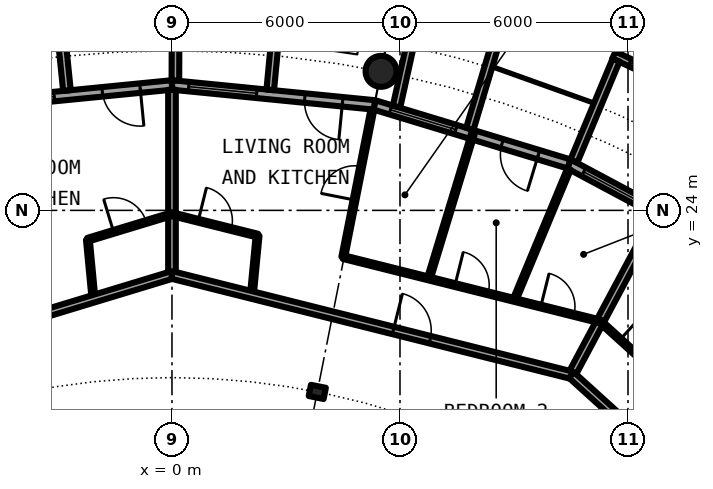
"""IFC4 building model, lengths in metres.
Left out: names, types, materials, properties, quantities, classifications, styles, units other than length and angle.
Written with IfcOpenShell. Run it as: python <this file> out.ifc"""

import sys

from ifc_helpers import new_model, si_unit, direction, frame, frame_2d, origin, origin_2d, place, context, subcontext, project, spatial, rectangle, circle, hollow_circle, i_section, extrude, element, fill, save


model = new_model("IFC4")
c1 = context("Model", 3, precision=1e-05, world=origin(), true_north=direction((0.0, 1.0)))
c2 = subcontext(c1, "Body", "Model", "MODEL_VIEW")
j1 = project(units=[si_unit("LENGTHUNIT", "METRE"), si_unit("PLANEANGLEUNIT", "RADIAN")], contexts=[c1])
p1 = place(None, origin())
s1 = spatial("IfcSite", under=j1, at=p1, CompositionType="ELEMENT")
p2 = place(p1, origin())
s2 = spatial("IfcBuilding", under=s1, at=p2, CompositionType="ELEMENT")
p3 = place(p2, frame((0.0, 0.0, 196.3)))
s3 = spatial("IfcBuildingStorey", under=s2, at=p3, CompositionType="ELEMENT", Elevation=196.3)
p4 = place(p3, frame((5.501, 27.658, 0.0), z_axis=(0.0, 0.0, 1.0), x_axis=(1.0, 0.0, 0.0)))
e1 = element("IfcColumn", 1, at=p4, inside=s3, PredefinedType="COLUMN", context=c2, shape_type="SweptSolid", body=[
    extrude(hollow_circle(Radius=0.406, WallThickness=0.03, at=origin_2d()), origin(), (0.0, 0.0, 1.0), 3.05),
])
p5 = place(p3, frame((3.824, 19.223, 0.0), z_axis=(0.0, 0.0, 1.0), x_axis=(0.195090322016, 0.980785280403, 0.0)))
e2 = element("IfcColumn", 2, at=p5, inside=s3, PredefinedType="COLUMN", context=c2, shape_type="SweptSolid", body=[
    extrude(i_section(OverallWidth=0.3, OverallDepth=0.4, WebThickness=0.013, FlangeThickness=0.024, FilletRadius=0.027, at=origin_2d()), origin(), (0.0, 0.0, 1.0), 3.05),
])
p6 = place(p3, frame((15.167, 22.699, 0.0), z_axis=(0.0, 0.0, 1.0), x_axis=(-0.881915646801, 0.471407246368, 0.0)))
e3 = element("IfcWall", 3, at=p6, inside=s3, PredefinedType="SOLIDWALL", context=c2, shape_type="SweptSolid", body=[
    extrude(rectangle(XDim=5.352, YDim=0.25, at=frame_2d((2.676, 0.0))), origin(), (0.0, 0.0, 1.0), 2.7),
])
p7 = place(p6, frame((0.841, 0.0, 0.0)))
e4 = element("IfcOpeningElement", 4, at=p7, cuts=e3, PredefinedType="OPENING", context=c2, shape_type="SweptSolid", body=[
    extrude(rectangle(XDim=1.0, YDim=2.2, at=frame_2d((0.5, 1.1))), frame((0.0, 0.135, 0.0), z_axis=(0.0, -1.0, 0.0), x_axis=(1.0, 0.0, 0.0)), (0.0, 0.0, 1.0), 0.27),
])
p8 = place(p6, frame((3.111, 0.0, 0.3)))
e5 = element("IfcOpeningElement", 5, at=p8, cuts=e3, PredefinedType="OPENING", context=c2, shape_type="SweptSolid", body=[
    extrude(rectangle(XDim=1.8, YDim=2.1, at=frame_2d((0.9, 1.05))), frame((0.0, 0.135, 0.0), z_axis=(0.0, -1.0, 0.0), x_axis=(1.0, 0.0, 0.0)), (0.0, 0.0, 1.0), 0.27),
])
p9 = place(p3, frame((14.335, 26.808, -0.03), z_axis=(0.0, 0.0, 1.0), x_axis=(-0.904000060331, 0.427532327342, 0.0)))
e6 = element("IfcWall", 6, at=p9, inside=s3, PredefinedType="SOLIDWALL", context=c2, shape_type="SweptSolid", body=[
    extrude(rectangle(XDim=2.993, YDim=0.2, at=frame_2d((1.497, 0.0))), origin(), (0.0, 0.0, 1.0), 2.73),
])
p10 = place(p9, frame((0.457, 0.0, 0.33)))
e7 = element("IfcOpeningElement", 7, at=p10, cuts=e6, PredefinedType="OPENING", context=c2, shape_type="SweptSolid", body=[
    extrude(circle(Radius=1.04, at=frame_2d((1.04, 1.04))), frame((0.0, 0.11, 0.0), z_axis=(0.0, -1.0, 0.0), x_axis=(1.0, 0.0, 0.0)), (0.0, 0.0, 1.0), 0.22),
])
p11 = place(p3, frame((10.575, 25.295, -0.03), z_axis=(0.0, 0.0, 1.0), x_axis=(0.385697364644, 0.922625353492, 0.0)))
e8 = element("IfcWall", 8, at=p11, inside=s3, PredefinedType="SOLIDWALL", context=c2, shape_type="SweptSolid", body=[
    extrude(rectangle(XDim=2.883, YDim=0.2, at=frame_2d((1.442, 0.0))), origin(), (0.0, 0.0, 1.0), 2.73),
])
p12 = place(p3, frame((10.447, 25.222, 0.0), z_axis=(0.0, 0.0, 1.0), x_axis=(-0.956965678721, 0.290201119486, 0.0)))
e9 = element("IfcWall", 9, at=p12, inside=s3, PredefinedType="SOLIDWALL", context=c2, shape_type="SweptSolid", body=[
    extrude(rectangle(XDim=5.351, YDim=0.25, at=frame_2d((2.676, 0.0))), origin(), (0.0, 0.0, 1.0), 2.7),
])
p13 = place(p12, frame((0.841, 0.0, 0.0)))
e10 = element("IfcOpeningElement", 10, at=p13, cuts=e9, PredefinedType="OPENING", context=c2, shape_type="SweptSolid", body=[
    extrude(rectangle(XDim=1.0, YDim=2.2, at=frame_2d((0.5, 1.1))), frame((0.0, 0.135, 0.0), z_axis=(0.0, -1.0, 0.0), x_axis=(1.0, 0.0, 0.0)), (0.0, 0.0, 1.0), 0.27),
])
p14 = place(p12, frame((3.111, 0.0, 0.3)))
e11 = element("IfcOpeningElement", 11, at=p14, cuts=e9, PredefinedType="OPENING", context=c2, shape_type="SweptSolid", body=[
    extrude(rectangle(XDim=1.8, YDim=2.1, at=frame_2d((0.9, 1.05))), frame((0.0, 0.135, 0.0), z_axis=(0.0, -1.0, 0.0), x_axis=(1.0, 0.0, 0.0)), (0.0, 0.0, 1.0), 0.27),
])
p15 = place(p3, frame((7.837, 26.144, -0.03), z_axis=(0.0, 0.0, 1.0), x_axis=(0.287064767992, 0.957911174889, 0.0)))
e12 = element("IfcWall", 12, at=p15, inside=s3, PredefinedType="SOLIDWALL", context=c2, shape_type="SweptSolid", body=[
    extrude(rectangle(XDim=3.006, YDim=0.2, at=frame_2d((1.503, 0.0))), origin(), (0.0, 0.0, 1.0), 2.73),
])
p16 = place(p3, frame((5.909, 26.729, -0.03), z_axis=(0.0, 0.0, 1.0), x_axis=(0.216409053917, 0.976302781612, 0.0)))
e13 = element("IfcWall", 13, at=p16, inside=s3, PredefinedType="SOLIDWALL", context=c2, shape_type="SweptSolid", body=[
    extrude(rectangle(XDim=2.925, YDim=0.2, at=frame_2d((1.463, 0.0))), origin(), (0.0, 0.0, 1.0), 2.73),
])
p17 = place(p3, frame((5.326, 26.775, 0.0), z_axis=(0.0, 0.0, 1.0), x_axis=(-0.995173996315, 0.098126026407, 0.0)))
e14 = element("IfcWall", 14, at=p17, inside=s3, PredefinedType="SOLIDWALL", context=c2, shape_type="SweptSolid", body=[
    extrude(rectangle(XDim=5.352, YDim=0.25, at=frame_2d((2.676, 0.0))), origin(), (0.0, 0.0, 1.0), 2.7),
])
p18 = place(p17, frame((0.841, 0.0, 0.0)))
e15 = element("IfcOpeningElement", 15, at=p18, cuts=e14, PredefinedType="OPENING", context=c2, shape_type="SweptSolid", body=[
    extrude(rectangle(XDim=1.0, YDim=2.2, at=frame_2d((0.5, 1.1))), frame((0.0, 0.135, 0.0), z_axis=(0.0, -1.0, 0.0), x_axis=(1.0, 0.0, 0.0)), (0.0, 0.0, 1.0), 0.27),
])
p19 = place(p17, frame((3.111, 0.0, 0.3)))
e16 = element("IfcOpeningElement", 16, at=p19, cuts=e14, PredefinedType="OPENING", context=c2, shape_type="SweptSolid", body=[
    extrude(rectangle(XDim=1.8, YDim=2.1, at=frame_2d((0.9, 1.05))), frame((0.0, 0.135, 0.0), z_axis=(0.0, -1.0, 0.0), x_axis=(1.0, 0.0, 0.0)), (0.0, 0.0, 1.0), 0.27),
])
p20 = place(p3, frame((2.586, 27.171, -0.03), z_axis=(0.0, 0.0, 1.0), x_axis=(0.094548432284, 0.995520262954, 0.0)))
e17 = element("IfcWall", 17, at=p20, inside=s3, PredefinedType="SOLIDWALL", context=c2, shape_type="SweptSolid", body=[
    extrude(rectangle(XDim=3.006, YDim=0.2, at=frame_2d((1.503, 0.0))), origin(), (0.0, 0.0, 1.0), 2.73),
])
p21 = place(p3, frame((0.09, 27.417, -0.03), z_axis=(0.0, 0.0, 1.0), x_axis=(0.00347308367, 0.999993968827, 0.0)))
e18 = element("IfcWall", 18, at=p21, inside=s3, PredefinedType="SOLIDWALL", context=c2, shape_type="SweptSolid", body=[
    extrude(rectangle(XDim=2.882, YDim=0.2, at=frame_2d((1.441, 0.0))), origin(), (0.0, 0.0, 1.0), 2.73),
])
p22 = place(p3, frame((0.0, 27.3, 0.0), z_axis=(0.0, 0.0, 1.0), x_axis=(-0.995173996315, -0.098126026407, 0.0)))
e19 = element("IfcWall", 19, at=p22, inside=s3, PredefinedType="SOLIDWALL", context=c2, shape_type="SweptSolid", body=[
    extrude(rectangle(XDim=5.352, YDim=0.25, at=frame_2d((2.676, 0.0))), origin(), (0.0, 0.0, 1.0), 2.7),
])
p23 = place(p22, frame((0.841, 0.0, 0.0)))
e20 = element("IfcOpeningElement", 20, at=p23, cuts=e19, PredefinedType="OPENING", context=c2, shape_type="SweptSolid", body=[
    extrude(rectangle(XDim=1.0, YDim=2.2, at=frame_2d((0.5, 1.1))), frame((0.0, 0.135, 0.0), z_axis=(0.0, -1.0, 0.0), x_axis=(1.0, 0.0, 0.0)), (0.0, 0.0, 1.0), 0.27),
])
p24 = place(p22, frame((3.111, 0.0, 0.3)))
e21 = element("IfcOpeningElement", 21, at=p24, cuts=e19, PredefinedType="OPENING", context=c2, shape_type="SweptSolid", body=[
    extrude(rectangle(XDim=1.8, YDim=2.1, at=frame_2d((0.9, 1.05))), frame((0.0, 0.135, 0.0), z_axis=(0.0, -1.0, 0.0), x_axis=(1.0, 0.0, 0.0)), (0.0, 0.0, 1.0), 0.27),
])
p25 = place(p3, frame((-2.764, 27.153, -0.03), z_axis=(0.0, 0.0, 1.0), x_axis=(-0.101505487237, 0.994834979311, 0.0)))
e22 = element("IfcWall", 22, at=p25, inside=s3, PredefinedType="SOLIDWALL", context=c2, shape_type="SweptSolid", body=[
    extrude(rectangle(XDim=3.007, YDim=0.2, at=frame_2d((1.503, 0.0))), origin(), (0.0, 0.0, 1.0), 2.73),
])
p26 = place(p3, frame((-2.213, 23.229, 0.0), z_axis=(0.0, 0.0, 1.0), x_axis=(0.094720578196, -0.995503898569, 0.0)))
e23 = element("IfcWall", 23, at=p26, inside=s3, PredefinedType="PARTITIONING", context=c2, shape_type="SweptSolid", body=[
    extrude(rectangle(XDim=1.562, YDim=0.1, at=frame_2d((0.781, 0.0))), origin(), (0.0, 0.0, 1.0), 2.7),
])
p27 = place(p3, frame((0.0, 22.3, 0.0), z_axis=(0.0, 0.0, 1.0), x_axis=(0.0, 1.0, 0.0)))
e24 = element("IfcWall", 24, at=p27, inside=s3, PredefinedType="PARTITIONING", context=c2, shape_type="SweptSolid", body=[
    extrude(rectangle(XDim=4.875, YDim=0.2, at=frame_2d((2.438, 0.0))), origin(), (0.0, 0.0, 1.0), 2.7),
])
p28 = place(p3, frame((2.102, 21.773, 0.0), z_axis=(0.0, 0.0, 1.0), x_axis=(0.09608568494, 0.995373066317, 0.0)))
e25 = element("IfcWall", 25, at=p28, inside=s3, PredefinedType="PARTITIONING", context=c2, shape_type="SweptSolid", body=[
    extrude(rectangle(XDim=1.57, YDim=0.1, at=frame_2d((0.785, 0.0))), origin(), (0.0, 0.0, 1.0), 2.7),
])
p29 = place(p3, frame((4.507, 22.771, 0.0), z_axis=(0.0, 0.0, 1.0), x_axis=(0.194030211642, 0.980995554001, 0.0)))
e26 = element("IfcWall", 26, at=p29, inside=s3, PredefinedType="PARTITIONING", context=c2, shape_type="SweptSolid", body=[
    extrude(rectangle(XDim=3.962, YDim=0.1, at=frame_2d((1.981, 0.0))), origin(), (0.0, 0.0, 1.0), 2.7),
])
p30 = place(p29, frame((1.531, 0.0, 0.0)))
e27 = element("IfcOpeningElement", 27, at=p30, cuts=e26, PredefinedType="OPENING", context=c2, shape_type="SweptSolid", body=[
    extrude(rectangle(XDim=0.9, YDim=2.3, at=frame_2d((0.45, 1.15))), frame((0.0, 0.06, 0.0), z_axis=(0.0, -1.0, 0.0), x_axis=(1.0, 0.0, 0.0)), (0.0, 0.0, 1.0), 0.12),
])
p31 = place(p3, frame((6.76, 22.207, 0.0), z_axis=(0.0, 0.0, 1.0), x_axis=(0.291291575636, 0.956634317785, 0.0)))
e28 = element("IfcWall", 28, at=p31, inside=s3, PredefinedType="PARTITIONING", context=c2, shape_type="SweptSolid", body=[
    extrude(rectangle(XDim=3.962, YDim=0.1, at=frame_2d((1.981, 0.0))), origin(), (0.0, 0.0, 1.0), 2.7),
])
p32 = place(p3, frame((9.013, 21.642, 0.0), z_axis=(0.0, 0.0, 1.0), x_axis=(0.384420204655, 0.923158223845, 0.0)))
e29 = element("IfcWall", 29, at=p32, inside=s3, PredefinedType="PARTITIONING", context=c2, shape_type="SweptSolid", body=[
    extrude(rectangle(XDim=3.73, YDim=0.1, at=frame_2d((1.865, 0.0))), origin(), (0.0, 0.0, 1.0), 2.7),
])
p33 = place(p3, frame((10.512, 19.667, 0.0), z_axis=(0.0, 0.0, 1.0), x_axis=(0.471271812246, 0.881988026553, 0.0)))
e30 = element("IfcWall", 30, at=p33, inside=s3, PredefinedType="PARTITIONING", context=c2, shape_type="SweptSolid", body=[
    extrude(rectangle(XDim=4.874, YDim=0.2, at=frame_2d((2.437, 0.0))), origin(), (0.0, 0.0, 1.0), 2.7),
])
p34 = place(p3, frame((12.118, 18.211, 0.0), z_axis=(0.0, 0.0, 1.0), x_axis=(0.554125989098, 0.832432813028, 0.0)))
e31 = element("IfcWall", 31, at=p34, inside=s3, PredefinedType="PARTITIONING", context=c2, shape_type="SweptSolid", body=[
    extrude(rectangle(XDim=1.57, YDim=0.1, at=frame_2d((0.785, 0.0))), origin(), (0.0, 0.0, 1.0), 2.7),
])
p35 = place(p3, frame((-12.389, 18.542, 0.0), z_axis=(0.0, 0.0, 1.0), x_axis=(0.956942051091, 0.290279022415, 0.0)))
e32 = element("IfcWall", 32, at=p35, inside=s3, PredefinedType="PARTITIONING", context=c2, shape_type="SweptSolid", body=[
    extrude(rectangle(XDim=12.946, YDim=0.2, at=frame_2d((6.473, 0.0))), origin(), (0.0, 0.0, 1.0), 2.7),
])
p36 = place(p35, frame((4.895, 0.0, 0.0)))
e33 = element("IfcOpeningElement", 33, at=p36, cuts=e32, PredefinedType="OPENING", context=c2, shape_type="SweptSolid", body=[
    extrude(rectangle(XDim=1.0, YDim=2.3, at=frame_2d((0.5, 1.15))), frame((0.0, 0.11, 0.0), z_axis=(0.0, -1.0, 0.0), x_axis=(1.0, 0.0, 0.0)), (0.0, 0.0, 1.0), 0.22),
])
p37 = place(p3, frame((0.0, 22.3, 0.0), z_axis=(0.0, 0.0, 1.0), x_axis=(0.969975381822, -0.243203122222, 0.0)))
e34 = element("IfcWall", 34, at=p37, inside=s3, PredefinedType="PARTITIONING", context=c2, shape_type="SweptSolid", body=[
    extrude(rectangle(XDim=10.843, YDim=0.2, at=frame_2d((5.421, 0.0))), origin(), (0.0, 0.0, 1.0), 2.7),
])
p38 = place(p37, frame((6.002, 0.0, 0.0)))
e35 = element("IfcOpeningElement", 35, at=p38, cuts=e34, PredefinedType="OPENING", context=c2, shape_type="SweptSolid", body=[
    extrude(rectangle(XDim=1.0, YDim=2.3, at=frame_2d((0.5, 1.15))), frame((0.0, 0.11, 0.0), z_axis=(0.0, -1.0, 0.0), x_axis=(1.0, 0.0, 0.0)), (0.0, 0.0, 1.0), 0.22),
])
p39 = place(p3, frame((10.512, 19.667, 0.0), z_axis=(0.0, 0.0, 1.0), x_axis=(0.740849323054, -0.67167125927, 0.0)))
e36 = element("IfcWall", 36, at=p39, inside=s3, PredefinedType="PARTITIONING", context=c2, shape_type="SweptSolid", body=[
    extrude(rectangle(XDim=10.842, YDim=0.2, at=frame_2d((5.421, 0.0))), origin(), (0.0, 0.0, 1.0), 2.7),
])
p40 = place(p39, frame((6.003, 0.0, 0.0)))
e37 = element("IfcOpeningElement", 37, at=p40, cuts=e36, PredefinedType="OPENING", context=c2, shape_type="SweptSolid", body=[
    extrude(rectangle(XDim=1.0, YDim=2.3, at=frame_2d((0.5, 1.15))), frame((0.0, 0.11, 0.0), z_axis=(0.0, -1.0, 0.0), x_axis=(1.0, 0.0, 0.0)), (0.0, 0.0, 1.0), 0.22),
])
p41 = place(p3, frame((-2.216, 23.228, 0.0), z_axis=(0.0, 0.0, 1.0), x_axis=(0.956912517924, 0.290376364464, 0.0)))
e38 = element("IfcWall", 38, at=p41, inside=s3, PredefinedType="PARTITIONING", context=c2, shape_type="SweptSolid", body=[
    extrude(rectangle(XDim=2.314, YDim=0.1, at=frame_2d((1.157, 0.0))), origin(), (0.0, 0.0, 1.0), 2.7),
])
p42 = place(p41, frame((0.71, 0.0, 0.0)))
e39 = element("IfcOpeningElement", 39, at=p42, cuts=e38, PredefinedType="OPENING", context=c2, shape_type="SweptSolid", body=[
    extrude(rectangle(XDim=0.9, YDim=2.3, at=frame_2d((0.45, 1.15))), frame((0.0, 0.06, 0.0), z_axis=(0.0, -1.0, 0.0), x_axis=(1.0, 0.0, 0.0)), (0.0, 0.0, 1.0), 0.12),
])
p43 = place(p3, frame((0.003, 23.899, 0.0), z_axis=(0.0, 0.0, 1.0), x_axis=(0.970074448647, -0.242807668911, 0.0)))
e40 = element("IfcWall", 40, at=p43, inside=s3, PredefinedType="PARTITIONING", context=c2, shape_type="SweptSolid", body=[
    extrude(rectangle(XDim=2.323, YDim=0.1, at=frame_2d((1.161, 0.0))), origin(), (0.0, 0.0, 1.0), 2.7),
])
p44 = place(p43, frame((0.708, 0.0, 0.0)))
e41 = element("IfcOpeningElement", 41, at=p44, cuts=e40, PredefinedType="OPENING", context=c2, shape_type="SweptSolid", body=[
    extrude(rectangle(XDim=0.9, YDim=2.3, at=frame_2d((0.45, 1.15))), frame((0.0, 0.06, 0.0), z_axis=(0.0, -1.0, 0.0), x_axis=(1.0, 0.0, 0.0)), (0.0, 0.0, 1.0), 0.12),
])
p45 = place(p3, frame((4.507, 22.771, 0.0), z_axis=(0.0, 0.0, 1.0), x_axis=(0.970020829306, -0.243021790611, 0.0)))
e42 = element("IfcWall", 42, at=p45, inside=s3, PredefinedType="PARTITIONING", context=c2, shape_type="SweptSolid", body=[
    extrude(rectangle(XDim=6.971, YDim=0.1, at=frame_2d((3.485, 0.0))), origin(), (0.0, 0.0, 1.0), 2.7),
])
p46 = place(p45, frame((3.031, 0.0, 0.0)))
e43 = element("IfcOpeningElement", 43, at=p46, cuts=e42, PredefinedType="OPENING", context=c2, shape_type="SweptSolid", body=[
    extrude(rectangle(XDim=0.9, YDim=2.3, at=frame_2d((0.45, 1.15))), frame((0.0, 0.06, 0.0), z_axis=(0.0, -1.0, 0.0), x_axis=(1.0, 0.0, 0.0)), (0.0, 0.0, 1.0), 0.12),
])
p47 = place(p45, frame((5.358, 0.0, 0.0)))
e44 = element("IfcOpeningElement", 44, at=p47, cuts=e42, PredefinedType="OPENING", context=c2, shape_type="SweptSolid", body=[
    extrude(rectangle(XDim=0.9, YDim=2.3, at=frame_2d((0.45, 1.15))), frame((0.0, 0.06, 0.0), z_axis=(0.0, -1.0, 0.0), x_axis=(1.0, 0.0, 0.0)), (0.0, 0.0, 1.0), 0.12),
])
p48 = place(p3, frame((11.271, 21.074, 0.0), z_axis=(0.0, 0.0, 1.0), x_axis=(0.74087097024, -0.671647381783, 0.0)))
e45 = element("IfcWall", 45, at=p48, inside=s3, PredefinedType="PARTITIONING", context=c2, shape_type="SweptSolid", body=[
    extrude(rectangle(XDim=2.324, YDim=0.1, at=frame_2d((1.162, 0.0))), origin(), (0.0, 0.0, 1.0), 2.7),
])
p49 = place(p48, frame((0.705, 0.0, 0.0)))
e46 = element("IfcOpeningElement", 46, at=p49, cuts=e45, PredefinedType="OPENING", context=c2, shape_type="SweptSolid", body=[
    extrude(rectangle(XDim=0.9, YDim=2.3, at=frame_2d((0.45, 1.15))), frame((0.0, 0.06, 0.0), z_axis=(0.0, -1.0, 0.0), x_axis=(1.0, 0.0, 0.0)), (0.0, 0.0, 1.0), 0.12),
])
p50 = place(p8, origin())
e47 = element("IfcWindow", 47, at=p50, inside=s3, PartitioningType="SINGLE_PANEL", PredefinedType="WINDOW", context=c2, shape_type="SweptSolid", body=[
    extrude(rectangle(XDim=1.8, YDim=2.1, at=frame_2d((0.9, 1.05))), frame((0.0, 0.03, 0.0), z_axis=(0.0, -1.0, 0.0), x_axis=(1.0, 0.0, 0.0)), (0.0, 0.0, 1.0), 0.06),
])
fill(e5, e47)
p51 = place(p10, origin())
e48 = element("IfcWindow", 48, at=p51, inside=s3, PartitioningType="SINGLE_PANEL", PredefinedType="WINDOW", context=c2, shape_type="SweptSolid", body=[
    extrude(circle(Radius=1.04, at=frame_2d((1.04, 1.04))), frame((0.0, 0.03, 0.0), z_axis=(0.0, -1.0, 0.0), x_axis=(1.0, 0.0, 0.0)), (0.0, 0.0, 1.0), 0.06),
])
fill(e7, e48)
p52 = place(p13, origin())
e49 = element("IfcDoor", 49, at=p52, inside=s3, OperationType="SINGLE_SWING_LEFT", PredefinedType="DOOR", context=c2, shape_type="SweptSolid", body=[
    extrude(rectangle(XDim=1.0, YDim=2.2, at=frame_2d((0.5, 1.1))), frame((0.0, 0.025, 0.0), z_axis=(0.0, -1.0, 0.0), x_axis=(1.0, 0.0, 0.0)), (0.0, 0.0, 1.0), 0.05),
])
fill(e10, e49)
p53 = place(p14, origin())
e50 = element("IfcWindow", 50, at=p53, inside=s3, PartitioningType="SINGLE_PANEL", PredefinedType="WINDOW", context=c2, shape_type="SweptSolid", body=[
    extrude(rectangle(XDim=1.8, YDim=2.1, at=frame_2d((0.9, 1.05))), frame((0.0, 0.03, 0.0), z_axis=(0.0, -1.0, 0.0), x_axis=(1.0, 0.0, 0.0)), (0.0, 0.0, 1.0), 0.06),
])
fill(e11, e50)
p54 = place(p18, origin())
e51 = element("IfcDoor", 51, at=p54, inside=s3, OperationType="SINGLE_SWING_LEFT", PredefinedType="DOOR", context=c2, shape_type="SweptSolid", body=[
    extrude(rectangle(XDim=1.0, YDim=2.2, at=frame_2d((0.5, 1.1))), frame((0.0, 0.025, 0.0), z_axis=(0.0, -1.0, 0.0), x_axis=(1.0, 0.0, 0.0)), (0.0, 0.0, 1.0), 0.05),
])
fill(e15, e51)
p55 = place(p19, origin())
e52 = element("IfcWindow", 52, at=p55, inside=s3, PartitioningType="SINGLE_PANEL", PredefinedType="WINDOW", context=c2, shape_type="SweptSolid", body=[
    extrude(rectangle(XDim=1.8, YDim=2.1, at=frame_2d((0.9, 1.05))), frame((0.0, 0.03, 0.0), z_axis=(0.0, -1.0, 0.0), x_axis=(1.0, 0.0, 0.0)), (0.0, 0.0, 1.0), 0.06),
])
fill(e16, e52)
p56 = place(p23, origin())
e53 = element("IfcDoor", 53, at=p56, inside=s3, OperationType="SINGLE_SWING_LEFT", PredefinedType="DOOR", context=c2, shape_type="SweptSolid", body=[
    extrude(rectangle(XDim=1.0, YDim=2.2, at=frame_2d((0.5, 1.1))), frame((0.0, 0.025, 0.0), z_axis=(0.0, -1.0, 0.0), x_axis=(1.0, 0.0, 0.0)), (0.0, 0.0, 1.0), 0.05),
])
fill(e20, e53)
p57 = place(p24, origin())
e54 = element("IfcWindow", 54, at=p57, inside=s3, PartitioningType="SINGLE_PANEL", PredefinedType="WINDOW", context=c2, shape_type="SweptSolid", body=[
    extrude(rectangle(XDim=1.8, YDim=2.1, at=frame_2d((0.9, 1.05))), frame((0.0, 0.03, 0.0), z_axis=(0.0, -1.0, 0.0), x_axis=(1.0, 0.0, 0.0)), (0.0, 0.0, 1.0), 0.06),
])
fill(e21, e54)
p58 = place(p49, origin())
e55 = element("IfcDoor", 55, at=p58, inside=s3, OperationType="SINGLE_SWING_LEFT", PredefinedType="DOOR", context=c2, shape_type="SweptSolid", body=[
    extrude(rectangle(XDim=0.9, YDim=2.3, at=frame_2d((0.45, 1.15))), frame((0.0, 0.025, 0.0), z_axis=(0.0, -1.0, 0.0), x_axis=(1.0, 0.0, 0.0)), (0.0, 0.0, 1.0), 0.05),
])
fill(e46, e55)
p59 = place(p38, origin())
e56 = element("IfcDoor", 56, at=p59, inside=s3, OperationType="SINGLE_SWING_RIGHT", PredefinedType="DOOR", context=c2, shape_type="SweptSolid", body=[
    extrude(rectangle(XDim=1.0, YDim=2.3, at=frame_2d((0.5, 1.15))), frame((0.0, 0.025, 0.0), z_axis=(0.0, -1.0, 0.0), x_axis=(1.0, 0.0, 0.0)), (0.0, 0.0, 1.0), 0.05),
])
fill(e35, e56)
p60 = place(p44, origin())
e57 = element("IfcDoor", 57, at=p60, inside=s3, OperationType="SINGLE_SWING_LEFT", PredefinedType="DOOR", context=c2, shape_type="SweptSolid", body=[
    extrude(rectangle(XDim=0.9, YDim=2.3, at=frame_2d((0.45, 1.15))), frame((0.0, 0.025, 0.0), z_axis=(0.0, -1.0, 0.0), x_axis=(1.0, 0.0, 0.0)), (0.0, 0.0, 1.0), 0.05),
])
fill(e41, e57)
p61 = place(p30, origin())
e58 = element("IfcDoor", 58, at=p61, inside=s3, OperationType="SINGLE_SWING_RIGHT", PredefinedType="DOOR", context=c2, shape_type="SweptSolid", body=[
    extrude(rectangle(XDim=0.9, YDim=2.3, at=frame_2d((0.45, 1.15))), frame((0.0, 0.025, 0.0), z_axis=(0.0, -1.0, 0.0), x_axis=(1.0, 0.0, 0.0)), (0.0, 0.0, 1.0), 0.05),
])
fill(e27, e58)
p62 = place(p46, origin())
e59 = element("IfcDoor", 59, at=p62, inside=s3, OperationType="SINGLE_SWING_LEFT", PredefinedType="DOOR", context=c2, shape_type="SweptSolid", body=[
    extrude(rectangle(XDim=0.9, YDim=2.3, at=frame_2d((0.45, 1.15))), frame((0.0, 0.025, 0.0), z_axis=(0.0, -1.0, 0.0), x_axis=(1.0, 0.0, 0.0)), (0.0, 0.0, 1.0), 0.05),
])
fill(e43, e59)
p63 = place(p47, origin())
e60 = element("IfcDoor", 60, at=p63, inside=s3, OperationType="SINGLE_SWING_RIGHT", PredefinedType="DOOR", context=c2, shape_type="SweptSolid", body=[
    extrude(rectangle(XDim=0.9, YDim=2.3, at=frame_2d((0.45, 1.15))), frame((0.0, 0.025, 0.0), z_axis=(0.0, -1.0, 0.0), x_axis=(1.0, 0.0, 0.0)), (0.0, 0.0, 1.0), 0.05),
])
fill(e44, e60)
p64 = place(p42, origin())
e61 = element("IfcDoor", 61, at=p64, inside=s3, OperationType="SINGLE_SWING_RIGHT", PredefinedType="DOOR", context=c2, shape_type="SweptSolid", body=[
    extrude(rectangle(XDim=0.9, YDim=2.3, at=frame_2d((0.45, 1.15))), frame((0.0, 0.025, 0.0), z_axis=(0.0, -1.0, 0.0), x_axis=(1.0, 0.0, 0.0)), (0.0, 0.0, 1.0), 0.05),
])
fill(e39, e61)
save(model, sys.argv[1])
